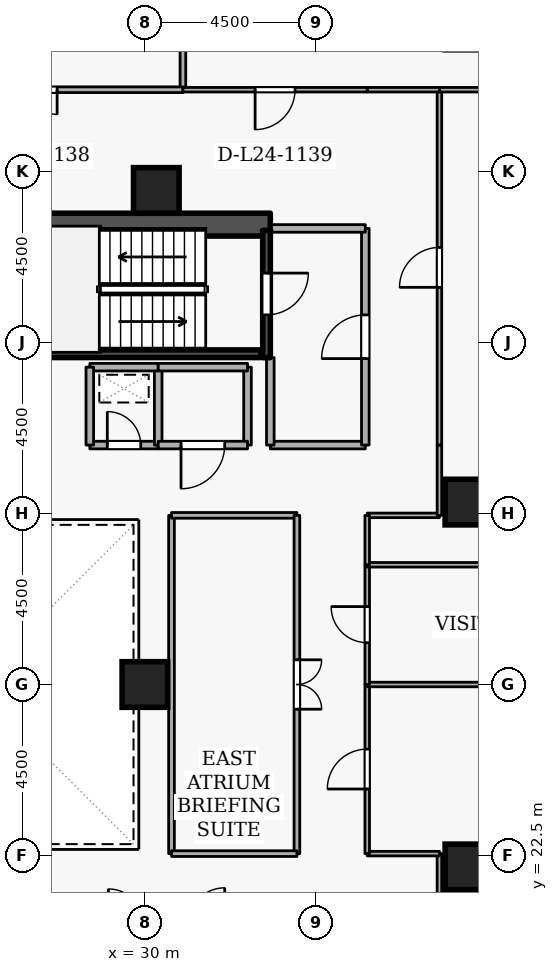
"""IFC4 building model, lengths in metres.
Left out: names, types, materials, properties, quantities, classifications, styles, units other than length and angle.
Written with IfcOpenShell. Run it as: python <this file> out.ifc"""

import sys

from ifc_helpers import new_model, si_unit, direction, frame, frame_2d, origin, origin_2d, place, context, subcontext, project, spatial, rectangle, extrude, element, fill, save


model = new_model("IFC4")
c1 = context("Model", 3, precision=1e-05, world=origin(), true_north=direction((0.0, 1.0)))
c2 = subcontext(c1, "Body", "Model", "MODEL_VIEW")
j1 = project(units=[si_unit("LENGTHUNIT", "METRE"), si_unit("PLANEANGLEUNIT", "RADIAN")], contexts=[c1])
p1 = place(None, origin())
s1 = spatial("IfcSite", under=j1, at=p1, CompositionType="ELEMENT")
p2 = place(p1, origin())
s2 = spatial("IfcBuilding", under=s1, at=p2, CompositionType="ELEMENT")
p3 = place(p2, frame((0.0, 0.0, 94.5)))
s3 = spatial("IfcBuildingStorey", under=s2, at=p3, CompositionType="ELEMENT", Elevation=94.5)
p4 = place(p3, frame((17.7, 39.1, 0.0), z_axis=(0.0, 0.0, 1.0), x_axis=(1.0, 0.0, 0.0)))
e1 = element("IfcWall", 1, at=p4, inside=s3, PredefinedType="SHEAR", context=c2, shape_type="SweptSolid", body=[
    extrude(rectangle(XDim=15.6, YDim=0.6, at=frame_2d((7.8, 0.0))), origin(), (0.0, 0.0, 1.0), 3.6),
])
for number, where, z_axis, x_axis in (
    (2, (38.5, 22.2, 0.0), (0.0, 0.0, 1.0), (1.0, 0.0, 0.0)),
    (3, (38.5, 31.8, 0.0), (0.0, 0.0, 1.0), (1.0, 0.0, 0.0)),
    (4, (30.3, 40.0, 0.0), (0.0, 0.0, 1.0), (1.0, 0.0, 0.0)),
    (5, (30.0, 27.0, 0.0), (0.0, 0.0, 1.0), (1.0, 0.0, 0.0)),
):
    element("IfcColumn", number, at=place(p3, frame(where, z_axis=z_axis, x_axis=x_axis)), inside=s3, PredefinedType="COLUMN", context=c2, shape_type="SweptSolid", body=[
        extrude(rectangle(XDim=1.2, YDim=1.2, at=origin_2d()), origin(), (0.0, 0.0, 1.0), 3.6),
    ])
p5 = place(p3, frame((33.2, 38.95, 0.0), z_axis=(0.0, 0.0, 1.0), x_axis=(0.0, -1.0, 0.0)))
e6 = element("IfcWall", 6, at=p5, inside=s3, PredefinedType="SHEAR", context=c2, shape_type="SweptSolid", body=[
    extrude(rectangle(XDim=3.35, YDim=0.2, at=frame_2d((1.675, 0.0))), origin(), (0.0, 0.0, 1.0), 3.6),
])
p6 = place(p5, frame((1.125, 0.0, 0.0)))
e7 = element("IfcOpeningElement", 7, at=p6, cuts=e6, PredefinedType="OPENING", context=c2, shape_type="SweptSolid", body=[
    extrude(rectangle(XDim=1.1, YDim=2.1, at=frame_2d((0.55, 1.05))), frame((0.0, 0.11, 0.0), z_axis=(0.0, -1.0, 0.0), x_axis=(1.0, 0.0, 0.0)), (0.0, 0.0, 1.0), 0.22),
])
p7 = place(p3, frame((25.95, 35.703, 0.0), z_axis=(0.0, 0.0, 1.0), x_axis=(1.0, 0.0, 0.0)))
e8 = element("IfcWall", 8, at=p7, inside=s3, PredefinedType="SHEAR", context=c2, shape_type="SweptSolid", body=[
    extrude(rectangle(XDim=7.1, YDim=0.2, at=frame_2d((3.55, 0.0))), origin(), (0.0, 0.0, 1.0), 3.6),
])
p8 = place(p3, frame((33.3, 33.3, 0.0), z_axis=(0.0, 0.0, 1.0), x_axis=(1.0, 0.0, 0.0)))
e9 = element("IfcWall", 9, at=p8, inside=s3, PredefinedType="STANDARD", context=c2, shape_type="SweptSolid", body=[
    extrude(rectangle(XDim=2.5, YDim=0.2, at=frame_2d((1.25, 0.0))), origin(), (0.0, 0.0, 1.0), 3.3),
])
p9 = place(p3, frame((35.8, 33.3, 0.0), z_axis=(0.0, 0.0, 1.0), x_axis=(0.0, 1.0, 0.0)))
e10 = element("IfcWall", 10, at=p9, inside=s3, PredefinedType="STANDARD", context=c2, shape_type="SweptSolid", body=[
    extrude(rectangle(XDim=5.7, YDim=0.2, at=frame_2d((2.85, 0.0))), origin(), (0.0, 0.0, 1.0), 3.3),
])
p10 = place(p9, frame((2.275, 0.0, 0.0)))
e11 = element("IfcOpeningElement", 11, at=p10, cuts=e10, PredefinedType="OPENING", context=c2, shape_type="SweptSolid", body=[
    extrude(rectangle(XDim=1.15, YDim=2.1, at=frame_2d((0.575, 1.05))), frame((0.0, 0.11, 0.0), z_axis=(0.0, -1.0, 0.0), x_axis=(1.0, 0.0, 0.0)), (0.0, 0.0, 1.0), 0.22),
])
p11 = place(p3, frame((35.8, 39.0, 0.0), z_axis=(0.0, 0.0, 1.0), x_axis=(-1.0, 0.0, 0.0)))
e12 = element("IfcWall", 12, at=p11, inside=s3, PredefinedType="STANDARD", context=c2, shape_type="SweptSolid", body=[
    extrude(rectangle(XDim=2.5, YDim=0.2, at=frame_2d((1.25, 0.0))), origin(), (0.0, 0.0, 1.0), 3.3),
])
p12 = place(p3, frame((33.3, 35.6, 0.0), z_axis=(0.0, 0.0, 1.0), x_axis=(0.0, -1.0, 0.0)))
e13 = element("IfcWall", 13, at=p12, inside=s3, PredefinedType="STANDARD", context=c2, shape_type="SweptSolid", body=[
    extrude(rectangle(XDim=2.3, YDim=0.2, at=frame_2d((1.15, 0.0))), origin(), (0.0, 0.0, 1.0), 2.505),
])
p13 = place(p3, frame((28.55, 33.3, 0.0), z_axis=(0.0, 0.0, 1.0), x_axis=(1.0, 0.0, 0.0)))
e14 = element("IfcWall", 14, at=p13, inside=s3, PredefinedType="STANDARD", context=c2, shape_type="SweptSolid", body=[
    extrude(rectangle(XDim=1.8, YDim=0.2, at=frame_2d((0.9, 0.0))), origin(), (0.0, 0.0, 1.0), 3.3),
])
p14 = place(p13, frame((0.46, 0.0, 0.0)))
e15 = element("IfcOpeningElement", 15, at=p14, cuts=e14, PredefinedType="OPENING", context=c2, shape_type="SweptSolid", body=[
    extrude(rectangle(XDim=0.88, YDim=2.04, at=frame_2d((0.44, 1.02))), frame((0.0, 0.11, 0.0), z_axis=(0.0, -1.0, 0.0), x_axis=(1.0, 0.0, 0.0)), (0.0, 0.0, 1.0), 0.22),
])
p15 = place(p3, frame((30.35, 33.3, 0.0), z_axis=(0.0, 0.0, 1.0), x_axis=(0.0, 1.0, 0.0)))
e16 = element("IfcWall", 16, at=p15, inside=s3, PredefinedType="STANDARD", context=c2, shape_type="SweptSolid", body=[
    extrude(rectangle(XDim=2.05, YDim=0.2, at=frame_2d((1.025, 0.0))), origin(), (0.0, 0.0, 1.0), 3.3),
])
p16 = place(p3, frame((30.35, 35.35, 0.0), z_axis=(0.0, 0.0, 1.0), x_axis=(-1.0, 0.0, 0.0)))
e17 = element("IfcWall", 17, at=p16, inside=s3, PredefinedType="STANDARD", context=c2, shape_type="SweptSolid", body=[
    extrude(rectangle(XDim=1.8, YDim=0.2, at=frame_2d((0.9, 0.0))), origin(), (0.0, 0.0, 1.0), 3.3),
])
p17 = place(p3, frame((28.55, 35.35, 0.0), z_axis=(0.0, 0.0, 1.0), x_axis=(0.0, -1.0, 0.0)))
e18 = element("IfcWall", 18, at=p17, inside=s3, PredefinedType="STANDARD", context=c2, shape_type="SweptSolid", body=[
    extrude(rectangle(XDim=2.05, YDim=0.2, at=frame_2d((1.025, 0.0))), origin(), (0.0, 0.0, 1.0), 3.3),
])
p18 = place(p3, frame((32.7, 35.35, 0.0), z_axis=(0.0, 0.0, 1.0), x_axis=(0.0, -1.0, 0.0)))
e19 = element("IfcWall", 19, at=p18, inside=s3, PredefinedType="STANDARD", context=c2, shape_type="SweptSolid", body=[
    extrude(rectangle(XDim=2.05, YDim=0.2, at=frame_2d((1.025, 0.0))), origin(), (0.0, 0.0, 1.0), 2.505),
])
p19 = place(p3, frame((32.7, 33.3, 0.0), z_axis=(0.0, 0.0, 1.0), x_axis=(-1.0, 0.0, 0.0)))
e20 = element("IfcWall", 20, at=p19, inside=s3, PredefinedType="STANDARD", context=c2, shape_type="SweptSolid", body=[
    extrude(rectangle(XDim=2.35, YDim=0.2, at=frame_2d((1.175, 0.0))), origin(), (0.0, 0.0, 1.0), 3.3),
])
p20 = place(p19, frame((0.6, 0.0, 0.0)))
e21 = element("IfcOpeningElement", 21, at=p20, cuts=e20, PredefinedType="OPENING", context=c2, shape_type="SweptSolid", body=[
    extrude(rectangle(XDim=1.15, YDim=2.1, at=frame_2d((0.575, 1.05))), frame((0.0, 0.11, 0.0), z_axis=(0.0, -1.0, 0.0), x_axis=(1.0, 0.0, 0.0)), (0.0, 0.0, 1.0), 0.22),
])
p21 = place(p3, frame((30.35, 35.35, 0.0), z_axis=(0.0, 0.0, 1.0), x_axis=(1.0, 0.0, 0.0)))
e22 = element("IfcWall", 22, at=p21, inside=s3, PredefinedType="STANDARD", context=c2, shape_type="SweptSolid", body=[
    extrude(rectangle(XDim=2.35, YDim=0.2, at=frame_2d((1.175, 0.0))), origin(), (0.0, 0.0, 1.0), 3.3),
])
p22 = place(p3, frame((37.75, 20.7, 0.0), z_axis=(0.0, 0.0, 1.0), x_axis=(0.0, 1.0, 0.0)))
e23 = element("IfcWall", 23, at=p22, inside=s3, PredefinedType="PARTITIONING", context=c2, shape_type="SweptSolid", body=[
    extrude(rectangle(XDim=1.85, YDim=0.12, at=frame_2d((0.925, 0.0))), origin(), (0.0, 0.0, 1.0), 3.3),
])
p23 = place(p3, frame((37.75, 22.55, 0.0), z_axis=(0.0, 0.0, 1.0), x_axis=(-1.0, 0.0, 0.0)))
e24 = element("IfcWall", 24, at=p23, inside=s3, PredefinedType="PARTITIONING", context=c2, shape_type="SweptSolid", body=[
    extrude(rectangle(XDim=1.9, YDim=0.12, at=frame_2d((0.95, 0.0))), origin(), (0.0, 0.0, 1.0), 3.3),
])
p24 = place(p3, frame((35.85, 22.55, 0.0), z_axis=(0.0, 0.0, 1.0), x_axis=(0.0, 1.0, 0.0)))
e25 = element("IfcWall", 25, at=p24, inside=s3, PredefinedType="PARTITIONING", context=c2, shape_type="SweptSolid", body=[
    extrude(rectangle(XDim=4.45, YDim=0.12, at=frame_2d((2.225, 0.0))), origin(), (0.0, 0.0, 1.0), 3.3),
])
p25 = place(p24, frame((1.7, 0.0, 0.0)))
e26 = element("IfcOpeningElement", 26, at=p25, cuts=e25, PredefinedType="OPENING", context=c2, shape_type="SweptSolid", body=[
    extrude(rectangle(XDim=1.05, YDim=2.1, at=frame_2d((0.525, 1.05))), frame((0.0, 0.07, 0.0), z_axis=(0.0, -1.0, 0.0), x_axis=(1.0, 0.0, 0.0)), (0.0, 0.0, 1.0), 0.14),
])
p26 = place(p3, frame((35.85, 27.0, 0.0), z_axis=(0.0, 0.0, 1.0), x_axis=(1.0, 0.0, 0.0)))
e27 = element("IfcWall", 27, at=p26, inside=s3, PredefinedType="PARTITIONING", context=c2, shape_type="SweptSolid", body=[
    extrude(rectangle(XDim=13.57, YDim=0.12, at=frame_2d((6.785, 0.0))), origin(), (0.0, 0.0, 1.0), 2.892),
])
p27 = place(p3, frame((35.85, 27.0, 0.0), z_axis=(0.0, 0.0, 1.0), x_axis=(0.0, 1.0, 0.0)))
e28 = element("IfcWall", 28, at=p27, inside=s3, PredefinedType="PARTITIONING", context=c2, shape_type="SweptSolid", body=[
    extrude(rectangle(XDim=3.15, YDim=0.12, at=frame_2d((1.575, 0.0))), origin(), (0.0, 0.0, 1.0), 3.3),
])
p28 = place(p27, frame((1.1, 0.0, 0.0)))
e29 = element("IfcOpeningElement", 29, at=p28, cuts=e28, PredefinedType="OPENING", context=c2, shape_type="SweptSolid", body=[
    extrude(rectangle(XDim=0.95, YDim=2.1, at=frame_2d((0.475, 1.05))), frame((0.0, 0.07, 0.0), z_axis=(0.0, -1.0, 0.0), x_axis=(1.0, 0.0, 0.0)), (0.0, 0.0, 1.0), 0.14),
])
p29 = place(p3, frame((35.85, 30.15, 0.0), z_axis=(0.0, 0.0, 1.0), x_axis=(1.0, 0.0, 0.0)))
e30 = element("IfcWall", 30, at=p29, inside=s3, PredefinedType="PARTITIONING", context=c2, shape_type="SweptSolid", body=[
    extrude(rectangle(XDim=13.57, YDim=0.12, at=frame_2d((6.785, 0.0))), origin(), (0.0, 0.0, 1.0), 3.3),
])
p30 = place(p3, frame((35.85, 31.45, 0.0), z_axis=(0.0, 0.0, 1.0), x_axis=(1.0, 0.0, 0.0)))
e31 = element("IfcWall", 31, at=p30, inside=s3, PredefinedType="PARTITIONING", context=c2, shape_type="SweptSolid", body=[
    extrude(rectangle(XDim=1.9, YDim=0.12, at=frame_2d((0.95, 0.0))), origin(), (0.0, 0.0, 1.0), 3.3),
])
p31 = place(p3, frame((37.75, 31.45, 0.0), z_axis=(0.0, 0.0, 1.0), x_axis=(0.0, 1.0, 0.0)))
e32 = element("IfcWall", 32, at=p31, inside=s3, PredefinedType="PARTITIONING", context=c2, shape_type="SweptSolid", body=[
    extrude(rectangle(XDim=1.85, YDim=0.12, at=frame_2d((0.925, 0.0))), origin(), (0.0, 0.0, 1.0), 3.3),
])
p32 = place(p3, frame((37.75, 33.3, 0.0), z_axis=(0.0, 0.0, 1.0), x_axis=(0.0, 1.0, 0.0)))
e33 = element("IfcWall", 33, at=p32, inside=s3, PredefinedType="PARTITIONING", context=c2, shape_type="SweptSolid", body=[
    extrude(rectangle(XDim=9.35, YDim=0.12, at=frame_2d((4.675, 0.0))), origin(), (0.0, 0.0, 1.0), 3.3),
])
p33 = place(p32, frame((4.15, 0.0, 0.0)))
e34 = element("IfcOpeningElement", 34, at=p33, cuts=e33, PredefinedType="OPENING", context=c2, shape_type="SweptSolid", body=[
    extrude(rectangle(XDim=1.05, YDim=2.1, at=frame_2d((0.525, 1.05))), frame((0.0, 0.07, 0.0), z_axis=(0.0, -1.0, 0.0), x_axis=(1.0, 0.0, 0.0)), (0.0, 0.0, 1.0), 0.14),
])
p34 = place(p3, frame((37.75, 42.65, 0.0), z_axis=(0.0, 0.0, 1.0), x_axis=(1.0, 0.0, 0.0)))
e35 = element("IfcWall", 35, at=p34, inside=s3, PredefinedType="PARTITIONING", context=c2, shape_type="SweptSolid", body=[
    extrude(rectangle(XDim=11.67, YDim=0.12, at=frame_2d((5.835, 0.0))), origin(), (0.0, 0.0, 1.0), 3.3),
])
p35 = place(p3, frame((35.85, 30.15, 0.0), z_axis=(0.0, 0.0, 1.0), x_axis=(0.0, 1.0, 0.0)))
e36 = element("IfcWall", 36, at=p35, inside=s3, PredefinedType="PARTITIONING", context=c2, shape_type="SweptSolid", body=[
    extrude(rectangle(XDim=1.3, YDim=0.12, at=frame_2d((0.65, 0.0))), origin(), (0.0, 0.0, 1.0), 3.3),
])
p36 = place(p3, frame((30.7, 22.55, 0.0), z_axis=(0.0, 0.0, 1.0), x_axis=(0.0, 1.0, 0.0)))
e37 = element("IfcWall", 37, at=p36, inside=s3, PredefinedType="PARTITIONING", context=c2, shape_type="SweptSolid", body=[
    extrude(rectangle(XDim=8.9, YDim=0.15, at=frame_2d((4.45, 0.0))), origin(), (0.0, 0.0, 1.0), 3.3),
])
p37 = place(p3, frame((30.7, 31.45, 0.0), z_axis=(0.0, 0.0, 1.0), x_axis=(1.0, 0.0, 0.0)))
e38 = element("IfcWall", 38, at=p37, inside=s3, PredefinedType="PARTITIONING", context=c2, shape_type="SweptSolid", body=[
    extrude(rectangle(XDim=3.3, YDim=0.15, at=frame_2d((1.65, 0.0))), origin(), (0.0, 0.0, 1.0), 3.3),
])
p38 = place(p3, frame((34.0, 31.45, 0.0), z_axis=(0.0, 0.0, 1.0), x_axis=(0.0, -1.0, 0.0)))
e39 = element("IfcWall", 39, at=p38, inside=s3, PredefinedType="PARTITIONING", context=c2, shape_type="SweptSolid", body=[
    extrude(rectangle(XDim=8.9, YDim=0.15, at=frame_2d((4.45, 0.0))), origin(), (0.0, 0.0, 1.0), 3.3),
])
p39 = place(p38, frame((3.8, 0.0, 0.0)))
e40 = element("IfcOpeningElement", 40, at=p39, cuts=e39, PredefinedType="OPENING", context=c2, shape_type="SweptSolid", body=[
    extrude(rectangle(XDim=1.3, YDim=2.12, at=frame_2d((0.65, 1.06))), frame((0.0, 0.085, 0.0), z_axis=(0.0, -1.0, 0.0), x_axis=(1.0, 0.0, 0.0)), (0.0, 0.0, 1.0), 0.17),
])
p40 = place(p3, frame((34.0, 22.55, 0.0), z_axis=(0.0, 0.0, 1.0), x_axis=(-1.0, 0.0, 0.0)))
e41 = element("IfcWall", 41, at=p40, inside=s3, PredefinedType="PARTITIONING", context=c2, shape_type="SweptSolid", body=[
    extrude(rectangle(XDim=3.3, YDim=0.15, at=frame_2d((1.65, 0.0))), origin(), (0.0, 0.0, 1.0), 3.3),
])
p41 = place(p3, frame((31.0, 50.92, 0.0), z_axis=(0.0, 0.0, 1.0), x_axis=(0.0, -1.0, 0.0)))
e42 = element("IfcWall", 42, at=p41, inside=s3, PredefinedType="PARTITIONING", context=c2, shape_type="SweptSolid", body=[
    extrude(rectangle(XDim=8.27, YDim=0.15, at=frame_2d((4.135, 0.0))), origin(), (0.0, 0.0, 1.0), 3.3),
])
p42 = place(p3, frame((31.0, 42.65, 0.0), z_axis=(0.0, 0.0, 1.0), x_axis=(-1.0, 0.0, 0.0)))
e43 = element("IfcWall", 43, at=p42, inside=s3, PredefinedType="PARTITIONING", context=c2, shape_type="SweptSolid", body=[
    extrude(rectangle(XDim=11.0, YDim=0.15, at=frame_2d((5.5, 0.0))), origin(), (0.0, 0.0, 1.0), 3.3),
])
p43 = place(p42, frame((3.31, 0.0, 0.0)))
e44 = element("IfcOpeningElement", 44, at=p43, cuts=e43, PredefinedType="OPENING", context=c2, shape_type="SweptSolid", body=[
    extrude(rectangle(XDim=1.3, YDim=2.12, at=frame_2d((0.65, 1.06))), frame((0.0, 0.085, 0.0), z_axis=(0.0, -1.0, 0.0), x_axis=(1.0, 0.0, 0.0)), (0.0, 0.0, 1.0), 0.17),
])
p44 = place(p3, frame((37.75, 42.65, 0.0), z_axis=(0.0, 0.0, 1.0), x_axis=(-1.0, 0.0, 0.0)))
e45 = element("IfcWall", 45, at=p44, inside=s3, PredefinedType="PARTITIONING", context=c2, shape_type="SweptSolid", body=[
    extrude(rectangle(XDim=1.9, YDim=0.12, at=frame_2d((0.95, 0.0))), origin(), (0.0, 0.0, 1.0), 2.855),
])
p45 = place(p3, frame((35.85, 42.65, 0.0), z_axis=(0.0, 0.0, 1.0), x_axis=(-1.0, 0.0, 0.0)))
e46 = element("IfcWall", 46, at=p45, inside=s3, PredefinedType="PARTITIONING", context=c2, shape_type="SweptSolid", body=[
    extrude(rectangle(XDim=4.85, YDim=0.12, at=frame_2d((2.425, 0.0))), origin(), (0.0, 0.0, 1.0), 2.855),
])
p46 = place(p45, frame((1.9, 0.0, 0.0)))
e47 = element("IfcOpeningElement", 47, at=p46, cuts=e46, PredefinedType="OPENING", context=c2, shape_type="SweptSolid", body=[
    extrude(rectangle(XDim=1.05, YDim=2.1, at=frame_2d((0.525, 1.05))), frame((0.0, 0.07, 0.0), z_axis=(0.0, -1.0, 0.0), x_axis=(1.0, 0.0, 0.0)), (0.0, 0.0, 1.0), 0.14),
])
p47 = place(p6, origin())
e48 = element("IfcDoor", 48, at=p47, inside=s3, OperationType="SINGLE_SWING_LEFT", PredefinedType="DOOR", context=c2, shape_type="SweptSolid", body=[
    extrude(rectangle(XDim=1.1, YDim=2.1, at=frame_2d((0.55, 1.05))), frame((0.0, 0.025, 0.0), z_axis=(0.0, -1.0, 0.0), x_axis=(1.0, 0.0, 0.0)), (0.0, 0.0, 1.0), 0.05),
])
fill(e7, e48)
p48 = place(p10, origin())
e49 = element("IfcDoor", 49, at=p48, inside=s3, OperationType="SINGLE_SWING_LEFT", PredefinedType="DOOR", context=c2, shape_type="SweptSolid", body=[
    extrude(rectangle(XDim=1.15, YDim=2.1, at=frame_2d((0.575, 1.05))), frame((0.0, 0.025, 0.0), z_axis=(0.0, -1.0, 0.0), x_axis=(1.0, 0.0, 0.0)), (0.0, 0.0, 1.0), 0.05),
])
fill(e11, e49)
p49 = place(p14, origin())
e50 = element("IfcDoor", 50, at=p49, inside=s3, OperationType="SINGLE_SWING_LEFT", PredefinedType="DOOR", context=c2, shape_type="SweptSolid", body=[
    extrude(rectangle(XDim=0.88, YDim=2.04, at=frame_2d((0.44, 1.02))), frame((0.0, 0.025, 0.0), z_axis=(0.0, -1.0, 0.0), x_axis=(1.0, 0.0, 0.0)), (0.0, 0.0, 1.0), 0.05),
])
fill(e15, e50)
p50 = place(p20, origin())
e51 = element("IfcDoor", 51, at=p50, inside=s3, OperationType="SINGLE_SWING_RIGHT", PredefinedType="DOOR", context=c2, shape_type="SweptSolid", body=[
    extrude(rectangle(XDim=1.15, YDim=2.1, at=frame_2d((0.575, 1.05))), frame((0.0, 0.025, 0.0), z_axis=(0.0, -1.0, 0.0), x_axis=(1.0, 0.0, 0.0)), (0.0, 0.0, 1.0), 0.05),
])
fill(e21, e51)
p51 = place(p25, origin())
e52 = element("IfcDoor", 52, at=p51, inside=s3, OperationType="SINGLE_SWING_LEFT", PredefinedType="DOOR", context=c2, shape_type="SweptSolid", body=[
    extrude(rectangle(XDim=1.05, YDim=2.1, at=frame_2d((0.525, 1.05))), frame((0.0, 0.025, 0.0), z_axis=(0.0, -1.0, 0.0), x_axis=(1.0, 0.0, 0.0)), (0.0, 0.0, 1.0), 0.05),
])
fill(e26, e52)
p52 = place(p28, origin())
e53 = element("IfcDoor", 53, at=p52, inside=s3, OperationType="SINGLE_SWING_RIGHT", PredefinedType="DOOR", context=c2, shape_type="SweptSolid", body=[
    extrude(rectangle(XDim=0.95, YDim=2.1, at=frame_2d((0.475, 1.05))), frame((0.0, 0.025, 0.0), z_axis=(0.0, -1.0, 0.0), x_axis=(1.0, 0.0, 0.0)), (0.0, 0.0, 1.0), 0.05),
])
fill(e29, e53)
p53 = place(p33, origin())
e54 = element("IfcDoor", 54, at=p53, inside=s3, OperationType="SINGLE_SWING_LEFT", PredefinedType="DOOR", context=c2, shape_type="SweptSolid", body=[
    extrude(rectangle(XDim=1.05, YDim=2.1, at=frame_2d((0.525, 1.05))), frame((0.0, 0.025, 0.0), z_axis=(0.0, -1.0, 0.0), x_axis=(1.0, 0.0, 0.0)), (0.0, 0.0, 1.0), 0.05),
])
fill(e34, e54)
p54 = place(p39, origin())
e55 = element("IfcDoor", 55, at=p54, inside=s3, OperationType="DOUBLE_DOOR_SINGLE_SWING", PredefinedType="DOOR", context=c2, shape_type="SweptSolid", body=[
    extrude(rectangle(XDim=1.3, YDim=2.12, at=frame_2d((0.65, 1.06))), frame((0.0, 0.025, 0.0), z_axis=(0.0, -1.0, 0.0), x_axis=(1.0, 0.0, 0.0)), (0.0, 0.0, 1.0), 0.05),
])
fill(e40, e55)
p55 = place(p43, origin())
e56 = element("IfcDoor", 56, at=p55, inside=s3, OperationType="DOUBLE_DOOR_SINGLE_SWING", PredefinedType="DOOR", context=c2, shape_type="SweptSolid", body=[
    extrude(rectangle(XDim=1.3, YDim=2.12, at=frame_2d((0.65, 1.06))), frame((0.0, 0.025, 0.0), z_axis=(0.0, -1.0, 0.0), x_axis=(1.0, 0.0, 0.0)), (0.0, 0.0, 1.0), 0.05),
])
fill(e44, e56)
p56 = place(p46, origin())
e57 = element("IfcDoor", 57, at=p56, inside=s3, OperationType="SINGLE_SWING_RIGHT", PredefinedType="DOOR", context=c2, shape_type="SweptSolid", body=[
    extrude(rectangle(XDim=1.05, YDim=2.1, at=frame_2d((0.525, 1.05))), frame((0.0, 0.025, 0.0), z_axis=(0.0, -1.0, 0.0), x_axis=(1.0, 0.0, 0.0)), (0.0, 0.0, 1.0), 0.05),
])
fill(e47, e57)
save(model, sys.argv[1])
